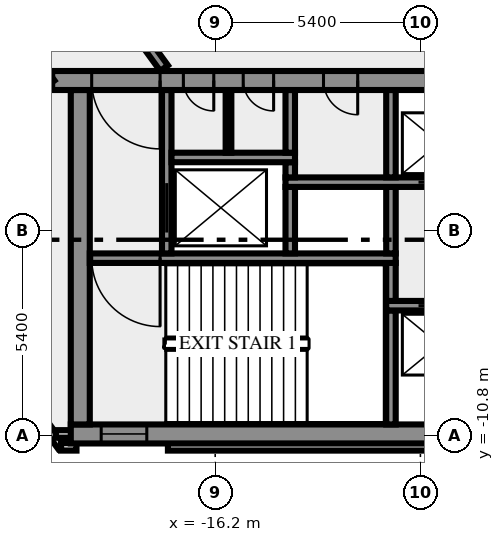
"""IFC4 building model, lengths in metres.
Left out: names, types, materials, properties, quantities, classifications, styles, units other than length and angle.
Written with IfcOpenShell. Run it as: python <this file> out.ifc"""

import sys

from ifc_helpers import new_model, si_unit, direction, frame, frame_2d, origin, place, context, subcontext, project, spatial, rectangle, extrude, element, fill, save


model = new_model("IFC4")
c1 = context("Model", 3, precision=1e-05, world=origin(), true_north=direction((0.0, 1.0)))
c2 = subcontext(c1, "Body", "Model", "MODEL_VIEW")
j1 = project(units=[si_unit("LENGTHUNIT", "METRE"), si_unit("PLANEANGLEUNIT", "RADIAN")], contexts=[c1])
p1 = place(None, origin())
s1 = spatial("IfcSite", under=j1, at=p1, CompositionType="ELEMENT")
p2 = place(p1, origin())
s2 = spatial("IfcBuilding", under=s1, at=p2, CompositionType="ELEMENT")
p3 = place(p2, frame((0.0, 0.0, 109.0)))
s3 = spatial("IfcBuildingStorey", under=s2, at=p3, CompositionType="ELEMENT", Elevation=109.0)
p4 = place(p3, frame((-21.833, -8.909, 0.0), z_axis=(0.0, 0.0, 1.0), x_axis=(0.587766567315, -0.809030569476, 0.0)))
e1 = element("IfcWall", 1, at=p4, inside=s3, PredefinedType="SOLIDWALL", context=c2, shape_type="SweptSolid", body=[
    extrude(rectangle(XDim=2.688, YDim=0.2, at=frame_2d((1.344, 0.0))), origin(), (0.0, 0.0, 1.0), 3.65),
])
p5 = place(p3, frame((-20.256, -11.088, 0.0), z_axis=(0.0, 0.0, 1.0), x_axis=(1.0, 0.0, 0.0)))
e2 = element("IfcWall", 2, at=p5, inside=s3, PredefinedType="SOLIDWALL", context=c2, shape_type="SweptSolid", body=[
    extrude(rectangle(XDim=0.406, YDim=0.2, at=frame_2d((0.203, 0.0))), origin(), (0.0, 0.0, 1.0), 3.65),
])
p6 = place(p3, frame((-17.444, -11.088, 0.0), z_axis=(0.0, 0.0, 1.0), x_axis=(1.0, 0.0, 0.0)))
e3 = element("IfcWall", 3, at=p6, inside=s3, PredefinedType="SOLIDWALL", context=c2, shape_type="SweptSolid", body=[
    extrude(rectangle(XDim=34.888, YDim=0.2, at=frame_2d((17.444, 0.0))), origin(), (0.0, 0.0, 1.0), 3.65),
])
p7 = place(p3, frame((-19.98, -10.75, 0.0), z_axis=(0.0, 0.0, 1.0), x_axis=(-1.0, 0.0, 0.0)))
e4 = element("IfcWall", 4, at=p7, inside=s3, PredefinedType="SOLIDWALL", context=c2, shape_type="SweptSolid", body=[
    extrude(rectangle(XDim=0.417, YDim=0.2, at=frame_2d((0.208, 0.0))), origin(), (0.0, 0.0, 1.0), 3.65),
])
p8 = place(p3, frame((-20.0, -10.75, 0.0), z_axis=(0.0, 0.0, 1.0), x_axis=(1.0, 0.0, 0.0)))
e5 = element("IfcWall", 5, at=p8, inside=s3, PredefinedType="SHEAR", context=c2, shape_type="SweptSolid", body=[
    extrude(rectangle(XDim=40.0, YDim=0.5, at=frame_2d((20.0, 0.0))), origin(), (0.0, 0.0, 1.0), 3.65),
])
p9 = place(p8, frame((0.8, 0.0, 1.0)))
e6 = element("IfcOpeningElement", 6, at=p9, cuts=e5, PredefinedType="OPENING", context=c2, shape_type="SweptSolid", body=[
    extrude(rectangle(XDim=1.2, YDim=1.2, at=frame_2d((0.6, 0.6))), frame((0.0, 0.26, 0.0), z_axis=(0.0, -1.0, 0.0), x_axis=(1.0, 0.0, 0.0)), (0.0, 0.0, 1.0), 0.52),
])
p10 = place(p8, frame((38.0, 0.0, 1.0)))
e7 = element("IfcOpeningElement", 7, at=p10, cuts=e5, PredefinedType="OPENING", context=c2, shape_type="SweptSolid", body=[
    extrude(rectangle(XDim=1.2, YDim=1.2, at=frame_2d((0.6, 0.6))), frame((0.0, 0.26, 0.0), z_axis=(0.0, -1.0, 0.0), x_axis=(1.0, 0.0, 0.0)), (0.0, 0.0, 1.0), 0.52),
])
p11 = place(p3, frame((-19.75, -10.5, 0.0), z_axis=(0.0, 0.0, 1.0), x_axis=(0.0, 1.0, 0.0)))
e8 = element("IfcWall", 8, at=p11, inside=s3, PredefinedType="SHEAR", context=c2, shape_type="SweptSolid", body=[
    extrude(rectangle(XDim=8.8, YDim=0.5, at=frame_2d((4.4, 0.0))), origin(), (0.0, 0.0, 1.0), 3.65),
])
p12 = place(p3, frame((-11.575, -10.5, 0.0), z_axis=(0.0, 0.0, 1.0), x_axis=(0.0, 1.0, 0.0)))
e9 = element("IfcWall", 9, at=p12, inside=s3, PredefinedType="SHEAR", context=c2, shape_type="SweptSolid", body=[
    extrude(rectangle(XDim=3.0, YDim=0.25, at=frame_2d((1.5, 0.0))), origin(), (0.0, 0.0, 1.0), 3.65),
])
p13 = place(p3, frame((11.7, -7.375, 0.0), z_axis=(0.0, 0.0, 1.0), x_axis=(-1.0, 0.0, 0.0)))
e10 = element("IfcWall", 10, at=p13, inside=s3, PredefinedType="SHEAR", context=c2, shape_type="SweptSolid", body=[
    extrude(rectangle(XDim=23.4, YDim=0.25, at=frame_2d((11.7, 0.0))), origin(), (0.0, 0.0, 1.0), 3.65),
])
p14 = place(p13, frame((21.45, 0.0, 0.0)))
e11 = element("IfcOpeningElement", 11, at=p14, cuts=e10, PredefinedType="OPENING", context=c2, shape_type="SweptSolid", body=[
    extrude(rectangle(XDim=1.1, YDim=2.1, at=frame_2d((0.55, 1.05))), frame((0.0, 0.135, 0.0), z_axis=(0.0, -1.0, 0.0), x_axis=(1.0, 0.0, 0.0)), (0.0, 0.0, 1.0), 0.27),
])
p15 = place(p13, frame((18.95, 0.0, 0.0)))
e12 = element("IfcOpeningElement", 12, at=p15, cuts=e10, PredefinedType="OPENING", context=c2, shape_type="SweptSolid", body=[
    extrude(rectangle(XDim=1.1, YDim=2.1, at=frame_2d((0.55, 1.05))), frame((0.0, 0.135, 0.0), z_axis=(0.0, -1.0, 0.0), x_axis=(1.0, 0.0, 0.0)), (0.0, 0.0, 1.0), 0.27),
])
p16 = place(p13, frame((16.45, 0.0, 0.0)))
e13 = element("IfcOpeningElement", 13, at=p16, cuts=e10, PredefinedType="OPENING", context=c2, shape_type="SweptSolid", body=[
    extrude(rectangle(XDim=1.1, YDim=2.1, at=frame_2d((0.55, 1.05))), frame((0.0, 0.135, 0.0), z_axis=(0.0, -1.0, 0.0), x_axis=(1.0, 0.0, 0.0)), (0.0, 0.0, 1.0), 0.27),
])
p17 = place(p13, frame((13.875, 0.0, 0.0)))
e14 = element("IfcOpeningElement", 14, at=p17, cuts=e10, PredefinedType="OPENING", context=c2, shape_type="SweptSolid", body=[
    extrude(rectangle(XDim=0.9, YDim=2.1, at=frame_2d((0.45, 1.05))), frame((0.0, 0.135, 0.0), z_axis=(0.0, -1.0, 0.0), x_axis=(1.0, 0.0, 0.0)), (0.0, 0.0, 1.0), 0.27),
])
p18 = place(p13, frame((11.1, 0.0, 0.0)))
e15 = element("IfcOpeningElement", 15, at=p18, cuts=e10, PredefinedType="OPENING", context=c2, shape_type="SweptSolid", body=[
    extrude(rectangle(XDim=0.9, YDim=2.1, at=frame_2d((0.45, 1.05))), frame((0.0, 0.135, 0.0), z_axis=(0.0, -1.0, 0.0), x_axis=(1.0, 0.0, 0.0)), (0.0, 0.0, 1.0), 0.27),
])
p19 = place(p3, frame((-11.575, -7.25, 0.0), z_axis=(0.0, 0.0, 1.0), x_axis=(0.0, 1.0, 0.0)))
e16 = element("IfcWall", 16, at=p19, inside=s3, PredefinedType="SHEAR", context=c2, shape_type="SweptSolid", body=[
    extrude(rectangle(XDim=1.0, YDim=0.25, at=frame_2d((0.5, 0.0))), origin(), (0.0, 0.0, 1.0), 3.65),
])
p20 = place(p3, frame((-11.45, -6.125, 0.0), z_axis=(0.0, 0.0, 1.0), x_axis=(-1.0, 0.0, 0.0)))
e17 = element("IfcWall", 17, at=p20, inside=s3, PredefinedType="SHEAR", context=c2, shape_type="SweptSolid", body=[
    extrude(rectangle(XDim=8.05, YDim=0.25, at=frame_2d((4.025, 0.0))), origin(), (0.0, 0.0, 1.0), 3.65),
])
p21 = place(p20, frame((6.2, 0.0, 0.0)))
e18 = element("IfcOpeningElement", 18, at=p21, cuts=e17, PredefinedType="OPENING", context=c2, shape_type="SweptSolid", body=[
    extrude(rectangle(XDim=1.8, YDim=2.1, at=frame_2d((0.9, 1.05))), frame((0.0, 0.135, 0.0), z_axis=(0.0, -1.0, 0.0), x_axis=(1.0, 0.0, 0.0)), (0.0, 0.0, 1.0), 0.27),
])
p22 = place(p3, frame((-17.475, -6.0, 0.0), z_axis=(0.0, 0.0, 1.0), x_axis=(0.0, 1.0, 0.0)))
e19 = element("IfcWall", 19, at=p22, inside=s3, PredefinedType="SHEAR", context=c2, shape_type="SweptSolid", body=[
    extrude(rectangle(XDim=4.3, YDim=0.25, at=frame_2d((2.15, 0.0))), origin(), (0.0, 0.0, 1.0), 3.65),
])
p23 = place(p22, frame((0.55, 0.0, 0.0)))
e20 = element("IfcOpeningElement", 20, at=p23, cuts=e19, PredefinedType="OPENING", context=c2, shape_type="SweptSolid", body=[
    extrude(rectangle(XDim=1.3, YDim=2.1, at=frame_2d((0.65, 1.05))), frame((0.0, 0.135, 0.0), z_axis=(0.0, -1.0, 0.0), x_axis=(1.0, 0.0, 0.0)), (0.0, 0.0, 1.0), 0.27),
])
for number, where, z_axis, x_axis in (
    (21, (-14.225, -6.0, 0.0), (0.0, 0.0, 1.0), (0.0, 1.0, 0.0)),
    (22, (-11.575, -6.0, 0.0), (0.0, 0.0, 1.0), (0.0, 1.0, 0.0)),
):
    element("IfcWall", number, at=place(p3, frame(where, z_axis=z_axis, x_axis=x_axis)), inside=s3, PredefinedType="SHEAR", context=c2, shape_type="SweptSolid", body=[
        extrude(rectangle(XDim=1.75, YDim=0.25, at=frame_2d((0.875, 0.0))), origin(), (0.0, 0.0, 1.0), 3.65),
    ])
p24 = place(p3, frame((-14.35, -4.125, 0.0), z_axis=(0.0, 0.0, 1.0), x_axis=(1.0, 0.0, 0.0)))
e23 = element("IfcWall", 23, at=p24, inside=s3, PredefinedType="SHEAR", context=c2, shape_type="SweptSolid", body=[
    extrude(rectangle(XDim=10.4, YDim=0.25, at=frame_2d((5.2, 0.0))), origin(), (0.0, 0.0, 1.0), 3.65),
])
p25 = place(p24, frame((3.5, 0.0, 0.0)))
e24 = element("IfcOpeningElement", 24, at=p25, cuts=e23, PredefinedType="OPENING", context=c2, shape_type="SweptSolid", body=[
    extrude(rectangle(XDim=1.1, YDim=2.1, at=frame_2d((0.55, 1.05))), frame((0.0, 0.135, 0.0), z_axis=(0.0, -1.0, 0.0), x_axis=(1.0, 0.0, 0.0)), (0.0, 0.0, 1.0), 0.27),
])
p26 = place(p24, frame((6.0, 0.0, 0.0)))
e25 = element("IfcOpeningElement", 25, at=p26, cuts=e23, PredefinedType="OPENING", context=c2, shape_type="SweptSolid", body=[
    extrude(rectangle(XDim=1.1, YDim=2.1, at=frame_2d((0.55, 1.05))), frame((0.0, 0.135, 0.0), z_axis=(0.0, -1.0, 0.0), x_axis=(1.0, 0.0, 0.0)), (0.0, 0.0, 1.0), 0.27),
])
p27 = place(p24, frame((8.5, 0.0, 0.0)))
e26 = element("IfcOpeningElement", 26, at=p27, cuts=e23, PredefinedType="OPENING", context=c2, shape_type="SweptSolid", body=[
    extrude(rectangle(XDim=1.1, YDim=2.1, at=frame_2d((0.55, 1.05))), frame((0.0, 0.135, 0.0), z_axis=(0.0, -1.0, 0.0), x_axis=(1.0, 0.0, 0.0)), (0.0, 0.0, 1.0), 0.27),
])
p28 = place(p3, frame((-14.225, -4.0, 0.0), z_axis=(0.0, 0.0, 1.0), x_axis=(0.0, 1.0, 0.0)))
e27 = element("IfcWall", 27, at=p28, inside=s3, PredefinedType="SHEAR", context=c2, shape_type="SweptSolid", body=[
    extrude(rectangle(XDim=0.4, YDim=0.25, at=frame_2d((0.2, 0.0))), origin(), (0.0, 0.0, 1.0), 3.65),
])
p29 = place(p3, frame((-11.575, -4.0, 0.0), z_axis=(0.0, 0.0, 1.0), x_axis=(0.0, 1.0, 0.0)))
e28 = element("IfcWall", 28, at=p29, inside=s3, PredefinedType="SHEAR", context=c2, shape_type="SweptSolid", body=[
    extrude(rectangle(XDim=2.3, YDim=0.25, at=frame_2d((1.15, 0.0))), origin(), (0.0, 0.0, 1.0), 3.65),
])
p30 = place(p3, frame((-17.35, -3.475, 0.0), z_axis=(0.0, 0.0, 1.0), x_axis=(1.0, 0.0, 0.0)))
e29 = element("IfcWall", 29, at=p30, inside=s3, PredefinedType="SHEAR", context=c2, shape_type="SweptSolid", body=[
    extrude(rectangle(XDim=3.25, YDim=0.25, at=frame_2d((1.625, 0.0))), origin(), (0.0, 0.0, 1.0), 3.65),
])
p31 = place(p3, frame((-15.85, -3.35, 0.0), z_axis=(0.0, 0.0, 1.0), x_axis=(0.0, 1.0, 0.0)))
e30 = element("IfcWall", 30, at=p31, inside=s3, PredefinedType="PARTITIONING", context=c2, shape_type="SweptSolid", body=[
    extrude(rectangle(XDim=1.65, YDim=0.15, at=frame_2d((0.825, 0.0))), origin(), (0.0, 0.0, 1.0), 3.65),
])
p32 = place(p3, frame((-14.225, -3.35, 0.0), z_axis=(0.0, 0.0, 1.0), x_axis=(0.0, 1.0, 0.0)))
e31 = element("IfcWall", 31, at=p32, inside=s3, PredefinedType="SHEAR", context=c2, shape_type="SweptSolid", body=[
    extrude(rectangle(XDim=1.65, YDim=0.25, at=frame_2d((0.825, 0.0))), origin(), (0.0, 0.0, 1.0), 3.65),
])
p33 = place(p3, frame((20.49, -1.45, 0.0), z_axis=(0.0, 0.0, 1.0), x_axis=(-1.0, 0.0, 0.0)))
e32 = element("IfcWall", 32, at=p33, inside=s3, PredefinedType="SHEAR", context=c2, shape_type="SweptSolid", body=[
    extrude(rectangle(XDim=40.98, YDim=0.5, at=frame_2d((20.49, 0.0))), origin(), (0.0, 0.0, 1.0), 3.65),
])
p34 = place(p33, frame((38.14, 0.0, 0.0)))
e33 = element("IfcOpeningElement", 33, at=p34, cuts=e32, PredefinedType="OPENING", context=c2, shape_type="SweptSolid", body=[
    extrude(rectangle(XDim=1.8, YDim=2.1, at=frame_2d((0.9, 1.05))), frame((0.0, 0.26, 0.0), z_axis=(0.0, -1.0, 0.0), x_axis=(1.0, 0.0, 0.0)), (0.0, 0.0, 1.0), 0.52),
])
p35 = place(p33, frame((36.728, 0.0, 0.0)))
e34 = element("IfcOpeningElement", 34, at=p35, cuts=e32, PredefinedType="OPENING", context=c2, shape_type="SweptSolid", body=[
    extrude(rectangle(XDim=0.8, YDim=2.1, at=frame_2d((0.4, 1.05))), frame((0.0, 0.26, 0.0), z_axis=(0.0, -1.0, 0.0), x_axis=(1.0, 0.0, 0.0)), (0.0, 0.0, 1.0), 0.52),
])
p36 = place(p33, frame((35.153, 0.0, 0.0)))
e35 = element("IfcOpeningElement", 35, at=p36, cuts=e32, PredefinedType="OPENING", context=c2, shape_type="SweptSolid", body=[
    extrude(rectangle(XDim=0.8, YDim=2.1, at=frame_2d((0.4, 1.05))), frame((0.0, 0.26, 0.0), z_axis=(0.0, -1.0, 0.0), x_axis=(1.0, 0.0, 0.0)), (0.0, 0.0, 1.0), 0.52),
])
p37 = place(p33, frame((32.94, 0.0, 0.0)))
e36 = element("IfcOpeningElement", 36, at=p37, cuts=e32, PredefinedType="OPENING", context=c2, shape_type="SweptSolid", body=[
    extrude(rectangle(XDim=0.9, YDim=2.1, at=frame_2d((0.45, 1.05))), frame((0.0, 0.26, 0.0), z_axis=(0.0, -1.0, 0.0), x_axis=(1.0, 0.0, 0.0)), (0.0, 0.0, 1.0), 0.52),
])
p38 = place(p33, frame((21.765, 0.0, 0.0)))
e37 = element("IfcOpeningElement", 37, at=p38, cuts=e32, PredefinedType="OPENING", context=c2, shape_type="SweptSolid", body=[
    extrude(rectangle(XDim=2.0, YDim=2.1, at=frame_2d((1.0, 1.05))), frame((0.0, 0.26, 0.0), z_axis=(0.0, -1.0, 0.0), x_axis=(1.0, 0.0, 0.0)), (0.0, 0.0, 1.0), 0.52),
])
p39 = place(p33, frame((7.14, 0.0, 0.0)))
e38 = element("IfcOpeningElement", 38, at=p39, cuts=e32, PredefinedType="OPENING", context=c2, shape_type="SweptSolid", body=[
    extrude(rectangle(XDim=0.9, YDim=2.1, at=frame_2d((0.45, 1.05))), frame((0.0, 0.26, 0.0), z_axis=(0.0, -1.0, 0.0), x_axis=(1.0, 0.0, 0.0)), (0.0, 0.0, 1.0), 0.52),
])
p40 = place(p33, frame((4.19, 0.0, 0.0)))
e39 = element("IfcOpeningElement", 39, at=p40, cuts=e32, PredefinedType="OPENING", context=c2, shape_type="SweptSolid", body=[
    extrude(rectangle(XDim=0.9, YDim=2.1, at=frame_2d((0.45, 1.05))), frame((0.0, 0.26, 0.0), z_axis=(0.0, -1.0, 0.0), x_axis=(1.0, 0.0, 0.0)), (0.0, 0.0, 1.0), 0.52),
])
p41 = place(p33, frame((1.04, 0.0, 0.0)))
e40 = element("IfcOpeningElement", 40, at=p41, cuts=e32, PredefinedType="OPENING", context=c2, shape_type="SweptSolid", body=[
    extrude(rectangle(XDim=1.8, YDim=2.1, at=frame_2d((0.9, 1.05))), frame((0.0, 0.26, 0.0), z_axis=(0.0, -1.0, 0.0), x_axis=(1.0, 0.0, 0.0)), (0.0, 0.0, 1.0), 0.52),
])
p42 = place(p3, frame((-20.531, -1.523, 0.0), z_axis=(0.0, 0.0, 1.0), x_axis=(-0.587784522481, 0.809017524614, 0.0)))
e41 = element("IfcWall", 41, at=p42, inside=s3, PredefinedType="SOLIDWALL", context=c2, shape_type="SweptSolid", body=[
    extrude(rectangle(XDim=49.912, YDim=0.25, at=frame_2d((24.956, 0.0))), origin(), (0.0, 0.0, 1.0), 3.65),
])
p43 = place(p42, frame((10.266, 0.0, 0.0)))
e42 = element("IfcOpeningElement", 42, at=p43, cuts=e41, PredefinedType="OPENING", context=c2, shape_type="SweptSolid", body=[
    extrude(rectangle(XDim=0.9, YDim=2.1, at=frame_2d((0.45, 1.05))), frame((0.0, 0.135, 0.0), z_axis=(0.0, -1.0, 0.0), x_axis=(1.0, 0.0, 0.0)), (0.0, 0.0, 1.0), 0.27),
])
p44 = place(p42, frame((32.366, 0.0, 0.0)))
e43 = element("IfcOpeningElement", 43, at=p44, cuts=e41, PredefinedType="OPENING", context=c2, shape_type="SweptSolid", body=[
    extrude(rectangle(XDim=1.8, YDim=2.1, at=frame_2d((0.9, 1.05))), frame((0.0, 0.135, 0.0), z_axis=(0.0, -1.0, 0.0), x_axis=(1.0, 0.0, 0.0)), (0.0, 0.0, 1.0), 0.27),
])
p45 = place(p42, frame((11.815, 0.0, 0.0)))
e44 = element("IfcOpeningElement", 44, at=p45, cuts=e41, PredefinedType="OPENING", context=c2, shape_type="SweptSolid", body=[
    extrude(rectangle(XDim=1.8, YDim=2.1, at=frame_2d((0.9, 1.05))), frame((0.0, 0.135, 0.0), z_axis=(0.0, -1.0, 0.0), x_axis=(1.0, 0.0, 0.0)), (0.0, 0.0, 1.0), 0.27),
])
p46 = place(p42, frame((48.57, 0.0, 0.0)))
e45 = element("IfcOpeningElement", 45, at=p46, cuts=e41, PredefinedType="OPENING", context=c2, shape_type="SweptSolid", body=[
    extrude(rectangle(XDim=0.9, YDim=2.1, at=frame_2d((0.45, 1.05))), frame((0.0, 0.135, 0.0), z_axis=(0.0, -1.0, 0.0), x_axis=(1.0, 0.0, 0.0)), (0.0, 0.0, 1.0), 0.27),
])
p47 = place(p42, frame((35.915, 0.0, 0.0)))
e46 = element("IfcOpeningElement", 46, at=p47, cuts=e41, PredefinedType="OPENING", context=c2, shape_type="SweptSolid", body=[
    extrude(rectangle(XDim=0.9, YDim=2.1, at=frame_2d((0.45, 1.05))), frame((0.0, 0.135, 0.0), z_axis=(0.0, -1.0, 0.0), x_axis=(1.0, 0.0, 0.0)), (0.0, 0.0, 1.0), 0.27),
])
p48 = place(p3, frame((-37.232, 25.972, 0.0), z_axis=(0.0, 0.0, 1.0), x_axis=(0.587786323093, -0.809016216391, 0.0)))
e47 = element("IfcWall", 47, at=p48, inside=s3, PredefinedType="SOLIDWALL", context=c2, shape_type="SweptSolid", body=[
    extrude(rectangle(XDim=33.493, YDim=0.25, at=frame_2d((16.747, 0.0))), origin(), (0.0, 0.0, 1.0), 3.65),
])
p49 = place(p48, frame((5.385, 0.0, 0.0)))
e48 = element("IfcOpeningElement", 48, at=p49, cuts=e47, PredefinedType="OPENING", context=c2, shape_type="SweptSolid", body=[
    extrude(rectangle(XDim=0.9, YDim=2.1, at=frame_2d((0.45, 1.05))), frame((0.0, 0.135, 0.0), z_axis=(0.0, -1.0, 0.0), x_axis=(1.0, 0.0, 0.0)), (0.0, 0.0, 1.0), 0.27),
])
p50 = place(p48, frame((6.985, 0.0, 0.0)))
e49 = element("IfcOpeningElement", 49, at=p50, cuts=e47, PredefinedType="OPENING", context=c2, shape_type="SweptSolid", body=[
    extrude(rectangle(XDim=0.9, YDim=2.1, at=frame_2d((0.45, 1.05))), frame((0.0, 0.135, 0.0), z_axis=(0.0, -1.0, 0.0), x_axis=(1.0, 0.0, 0.0)), (0.0, 0.0, 1.0), 0.27),
])
p51 = place(p9, origin())
e50 = element("IfcWindow", 50, at=p51, inside=s3, PartitioningType="SINGLE_PANEL", PredefinedType="WINDOW", context=c2, shape_type="SweptSolid", body=[
    extrude(rectangle(XDim=1.2, YDim=1.2, at=frame_2d((0.6, 0.6))), frame((0.0, 0.03, 0.0), z_axis=(0.0, -1.0, 0.0), x_axis=(1.0, 0.0, 0.0)), (0.0, 0.0, 1.0), 0.06),
])
fill(e6, e50)
p52 = place(p14, origin())
e51 = element("IfcDoor", 51, at=p52, inside=s3, OperationType="DOUBLE_DOOR_SLIDING", PredefinedType="DOOR", context=c2, shape_type="SweptSolid", body=[
    extrude(rectangle(XDim=1.1, YDim=2.1, at=frame_2d((0.55, 1.05))), frame((0.0, 0.025, 0.0), z_axis=(0.0, -1.0, 0.0), x_axis=(1.0, 0.0, 0.0)), (0.0, 0.0, 1.0), 0.05),
])
fill(e11, e51)
p53 = place(p21, origin())
e52 = element("IfcDoor", 52, at=p53, inside=s3, OperationType="DOUBLE_DOOR_SINGLE_SWING", PredefinedType="DOOR", context=c2, shape_type="SweptSolid", body=[
    extrude(rectangle(XDim=1.8, YDim=2.1, at=frame_2d((0.9, 1.05))), frame((0.0, 0.025, 0.0), z_axis=(0.0, -1.0, 0.0), x_axis=(1.0, 0.0, 0.0)), (0.0, 0.0, 1.0), 0.05),
])
fill(e18, e52)
p54 = place(p23, origin())
e53 = element("IfcDoor", 53, at=p54, inside=s3, OperationType="DOUBLE_DOOR_SLIDING", PredefinedType="DOOR", context=c2, shape_type="SweptSolid", body=[
    extrude(rectangle(XDim=1.3, YDim=2.1, at=frame_2d((0.65, 1.05))), frame((0.0, 0.025, 0.0), z_axis=(0.0, -1.0, 0.0), x_axis=(1.0, 0.0, 0.0)), (0.0, 0.0, 1.0), 0.05),
])
fill(e20, e53)
p55 = place(p25, origin())
e54 = element("IfcDoor", 54, at=p55, inside=s3, OperationType="DOUBLE_DOOR_SLIDING", PredefinedType="DOOR", context=c2, shape_type="SweptSolid", body=[
    extrude(rectangle(XDim=1.1, YDim=2.1, at=frame_2d((0.55, 1.05))), frame((0.0, 0.025, 0.0), z_axis=(0.0, -1.0, 0.0), x_axis=(1.0, 0.0, 0.0)), (0.0, 0.0, 1.0), 0.05),
])
fill(e24, e54)
p56 = place(p34, origin())
e55 = element("IfcDoor", 55, at=p56, inside=s3, OperationType="DOUBLE_DOOR_SINGLE_SWING", PredefinedType="DOOR", context=c2, shape_type="SweptSolid", body=[
    extrude(rectangle(XDim=1.8, YDim=2.1, at=frame_2d((0.9, 1.05))), frame((0.0, 0.025, 0.0), z_axis=(0.0, -1.0, 0.0), x_axis=(1.0, 0.0, 0.0)), (0.0, 0.0, 1.0), 0.05),
])
fill(e33, e55)
p57 = place(p35, origin())
e56 = element("IfcDoor", 56, at=p57, inside=s3, OperationType="SINGLE_SWING_RIGHT", PredefinedType="DOOR", context=c2, shape_type="SweptSolid", body=[
    extrude(rectangle(XDim=0.8, YDim=2.1, at=frame_2d((0.4, 1.05))), frame((0.0, 0.025, 0.0), z_axis=(0.0, -1.0, 0.0), x_axis=(1.0, 0.0, 0.0)), (0.0, 0.0, 1.0), 0.05),
])
fill(e34, e56)
p58 = place(p36, origin())
e57 = element("IfcDoor", 57, at=p58, inside=s3, OperationType="SINGLE_SWING_RIGHT", PredefinedType="DOOR", context=c2, shape_type="SweptSolid", body=[
    extrude(rectangle(XDim=0.8, YDim=2.1, at=frame_2d((0.4, 1.05))), frame((0.0, 0.025, 0.0), z_axis=(0.0, -1.0, 0.0), x_axis=(1.0, 0.0, 0.0)), (0.0, 0.0, 1.0), 0.05),
])
fill(e35, e57)
p59 = place(p37, origin())
e58 = element("IfcDoor", 58, at=p59, inside=s3, OperationType="SINGLE_SWING_RIGHT", PredefinedType="DOOR", context=c2, shape_type="SweptSolid", body=[
    extrude(rectangle(XDim=0.9, YDim=2.1, at=frame_2d((0.45, 1.05))), frame((0.0, 0.025, 0.0), z_axis=(0.0, -1.0, 0.0), x_axis=(1.0, 0.0, 0.0)), (0.0, 0.0, 1.0), 0.05),
])
fill(e36, e58)
save(model, sys.argv[1])
